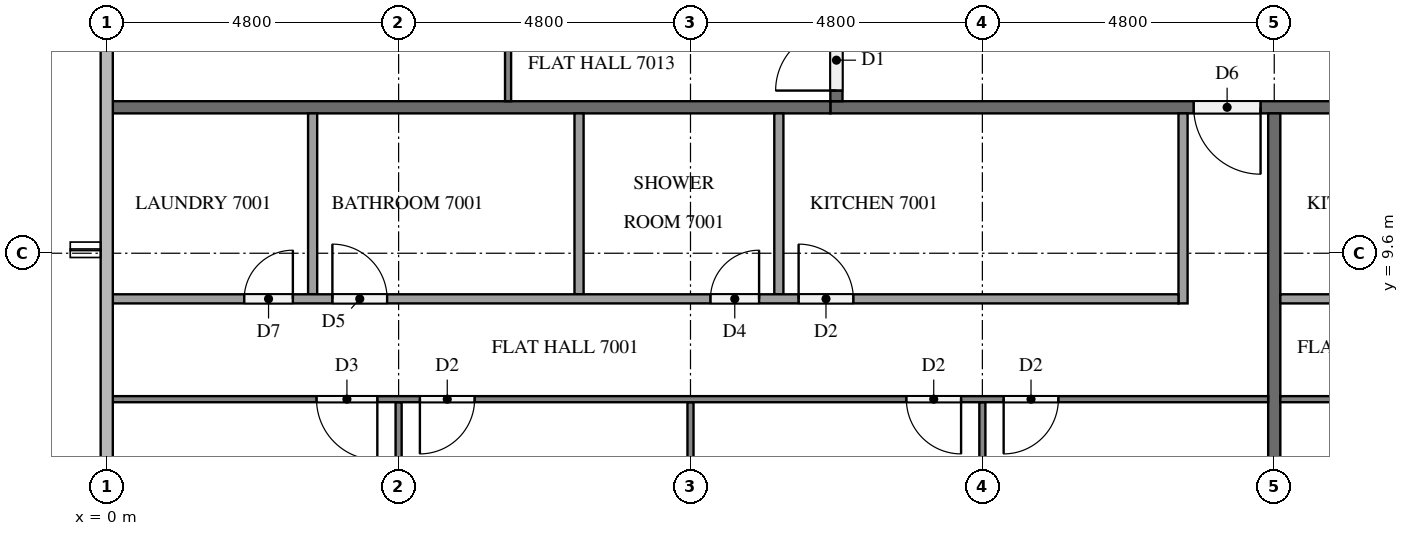
"""IFC4 building model, lengths in metres.
Left out: names, types, materials, properties, quantities, classifications, styles, units other than length and angle.
Written with IfcOpenShell. Run it as: python <this file> out.ifc"""

import sys

from ifc_helpers import new_model, si_unit, direction, frame, frame_2d, origin, place, context, subcontext, project, spatial, rectangle, extrude, element, fill, save


model = new_model("IFC4")
c1 = context("Model", 3, precision=1e-05, world=origin(), true_north=direction((0.0, 1.0)))
c2 = subcontext(c1, "Body", "Model", "MODEL_VIEW")
j1 = project(units=[si_unit("LENGTHUNIT", "METRE"), si_unit("PLANEANGLEUNIT", "RADIAN")], contexts=[c1])
p1 = place(None, origin())
s1 = spatial("IfcSite", under=j1, at=p1, CompositionType="ELEMENT")
p2 = place(p1, origin())
s2 = spatial("IfcBuilding", under=s1, at=p2, CompositionType="ELEMENT")
p3 = place(p2, frame((0.0, 0.0, 268.6)))
s3 = spatial("IfcBuildingStorey", under=s2, at=p3, CompositionType="ELEMENT", Elevation=268.6)
p4 = place(p3, frame((50.5, 12.0, 0.0), z_axis=(0.0, 0.0, 1.0), x_axis=(-1.0, 0.0, 0.0)))
e1 = element("IfcWall", 1, at=p4, inside=s3, PredefinedType="PARTITIONING", context=c2, shape_type="SweptSolid", body=[
    extrude(rectangle(XDim=38.6, YDim=0.2, at=frame_2d((19.3, 0.0))), origin(), (0.0, 0.0, 1.0), 3.2),
])
p5 = place(p4, frame((31.525, 0.0, 0.0)))
e2 = element("IfcOpeningElement", 2, at=p5, cuts=e1, PredefinedType="OPENING", context=c2, shape_type="SweptSolid", body=[
    extrude(rectangle(XDim=1.1, YDim=2.1, at=frame_2d((0.55, 1.05))), frame((0.0, 0.11, 0.0), z_axis=(0.0, -1.0, 0.0), x_axis=(1.0, 0.0, 0.0)), (0.0, 0.0, 1.0), 0.22),
])
p6 = place(p4, frame((19.575, 0.0, 0.0)))
e3 = element("IfcOpeningElement", 3, at=p6, cuts=e1, PredefinedType="OPENING", context=c2, shape_type="SweptSolid", body=[
    extrude(rectangle(XDim=1.0, YDim=2.1, at=frame_2d((0.5, 1.05))), frame((0.0, 0.11, 0.0), z_axis=(0.0, -1.0, 0.0), x_axis=(1.0, 0.0, 0.0)), (0.0, 0.0, 1.0), 0.22),
])
p7 = place(p4, frame((18.025, 0.0, 0.0)))
e4 = element("IfcOpeningElement", 4, at=p7, cuts=e1, PredefinedType="OPENING", context=c2, shape_type="SweptSolid", body=[
    extrude(rectangle(XDim=1.0, YDim=2.1, at=frame_2d((0.5, 1.05))), frame((0.0, 0.11, 0.0), z_axis=(0.0, -1.0, 0.0), x_axis=(1.0, 0.0, 0.0)), (0.0, 0.0, 1.0), 0.22),
])
p8 = place(p4, frame((1.225, 0.0, 0.0)))
e5 = element("IfcOpeningElement", 5, at=p8, cuts=e1, PredefinedType="OPENING", context=c2, shape_type="SweptSolid", body=[
    extrude(rectangle(XDim=1.0, YDim=2.1, at=frame_2d((0.5, 1.05))), frame((0.0, 0.11, 0.0), z_axis=(0.0, -1.0, 0.0), x_axis=(1.0, 0.0, 0.0)), (0.0, 0.0, 1.0), 0.22),
])
p9 = place(p3, frame((12.0, 12.1, 0.0), z_axis=(0.0, 0.0, 1.0), x_axis=(0.0, 1.0, 0.0)))
e6 = element("IfcWall", 6, at=p9, inside=s3, PredefinedType="PARTITIONING", context=c2, shape_type="SweptSolid", body=[
    extrude(rectangle(XDim=28.6, YDim=0.2, at=frame_2d((14.3, 0.0))), origin(), (0.0, 0.0, 1.0), 3.2),
])
p10 = place(p9, frame((24.175, 0.0, 0.0)))
e7 = element("IfcOpeningElement", 7, at=p10, cuts=e6, PredefinedType="OPENING", context=c2, shape_type="SweptSolid", body=[
    extrude(rectangle(XDim=1.0, YDim=2.1, at=frame_2d((0.5, 1.05))), frame((0.0, 0.11, 0.0), z_axis=(0.0, -1.0, 0.0), x_axis=(1.0, 0.0, 0.0)), (0.0, 0.0, 1.0), 0.22),
])
p11 = place(p9, frame((14.575, 0.0, 0.0)))
e8 = element("IfcOpeningElement", 8, at=p11, cuts=e6, PredefinedType="OPENING", context=c2, shape_type="SweptSolid", body=[
    extrude(rectangle(XDim=1.0, YDim=2.1, at=frame_2d((0.5, 1.05))), frame((0.0, 0.11, 0.0), z_axis=(0.0, -1.0, 0.0), x_axis=(1.0, 0.0, 0.0)), (0.0, 0.0, 1.0), 0.22),
])
p12 = place(p9, frame((0.175, 0.0, 0.0)))
e9 = element("IfcOpeningElement", 9, at=p12, cuts=e6, PredefinedType="OPENING", context=c2, shape_type="SweptSolid", body=[
    extrude(rectangle(XDim=1.0, YDim=2.1, at=frame_2d((0.5, 1.05))), frame((0.0, 0.11, 0.0), z_axis=(0.0, -1.0, 0.0), x_axis=(1.0, 0.0, 0.0)), (0.0, 0.0, 1.0), 0.22),
])
for number, where, z_axis, x_axis in (
    (10, (19.2, 11.9, 0.0), (0.0, 0.0, 1.0), (0.0, -1.0, 0.0)),
    (11, (0.1, 12.0, 0.0), (0.0, 0.0, 1.0), (1.0, 0.0, 0.0)),
):
    element("IfcWall", number, at=place(p3, frame(where, z_axis=z_axis, x_axis=x_axis)), inside=s3, PredefinedType="PARTITIONING", context=c2, shape_type="SweptSolid", body=[
        extrude(rectangle(XDim=11.8, YDim=0.2, at=frame_2d((5.9, 0.0))), origin(), (0.0, 0.0, 1.0), 3.2),
    ])
p13 = place(p3, frame((14.4, 7.15, 0.0), z_axis=(0.0, 0.0, 1.0), x_axis=(0.0, -1.0, 0.0)))
e12 = element("IfcWall", 12, at=p13, inside=s3, PredefinedType="PARTITIONING", context=c2, shape_type="SweptSolid", body=[
    extrude(rectangle(XDim=6.9, YDim=0.1, at=frame_2d((3.45, 0.0))), origin(), (0.0, 0.0, 1.0), 3.2),
])
p14 = place(p3, frame((9.6, 7.15, 0.0), z_axis=(0.0, 0.0, 1.0), x_axis=(0.0, -1.0, 0.0)))
e13 = element("IfcWall", 13, at=p14, inside=s3, PredefinedType="PARTITIONING", context=c2, shape_type="SweptSolid", body=[
    extrude(rectangle(XDim=7.05, YDim=0.1, at=frame_2d((3.525, 0.0))), origin(), (0.0, 0.0, 1.0), 3.2),
])
p15 = place(p3, frame((4.8, 7.15, 0.0), z_axis=(0.0, 0.0, 1.0), x_axis=(0.0, -1.0, 0.0)))
e14 = element("IfcWall", 14, at=p15, inside=s3, PredefinedType="PARTITIONING", context=c2, shape_type="SweptSolid", body=[
    extrude(rectangle(XDim=6.85, YDim=0.1, at=frame_2d((3.425, 0.0))), origin(), (0.0, 0.0, 1.0), 3.2),
])
p16 = place(p3, frame((19.1, 7.2, 0.0), z_axis=(0.0, 0.0, 1.0), x_axis=(-1.0, 0.0, 0.0)))
e15 = element("IfcWall", 15, at=p16, inside=s3, PredefinedType="PARTITIONING", context=c2, shape_type="SweptSolid", body=[
    extrude(rectangle(XDim=19.0, YDim=0.1, at=frame_2d((9.5, 0.0))), origin(), (0.0, 0.0, 1.0), 3.2),
])
p17 = place(p16, frame((3.45, 0.0, 0.0)))
e16 = element("IfcOpeningElement", 16, at=p17, cuts=e15, PredefinedType="OPENING", context=c2, shape_type="SweptSolid", body=[
    extrude(rectangle(XDim=0.9, YDim=2.1, at=frame_2d((0.45, 1.05))), frame((0.0, 0.06, 0.0), z_axis=(0.0, -1.0, 0.0), x_axis=(1.0, 0.0, 0.0)), (0.0, 0.0, 1.0), 0.12),
])
p18 = place(p16, frame((5.05, 0.0, 0.0)))
e17 = element("IfcOpeningElement", 17, at=p18, cuts=e15, PredefinedType="OPENING", context=c2, shape_type="SweptSolid", body=[
    extrude(rectangle(XDim=0.9, YDim=2.1, at=frame_2d((0.45, 1.05))), frame((0.0, 0.06, 0.0), z_axis=(0.0, -1.0, 0.0), x_axis=(1.0, 0.0, 0.0)), (0.0, 0.0, 1.0), 0.12),
])
p19 = place(p16, frame((13.05, 0.0, 0.0)))
e18 = element("IfcOpeningElement", 18, at=p19, cuts=e15, PredefinedType="OPENING", context=c2, shape_type="SweptSolid", body=[
    extrude(rectangle(XDim=0.9, YDim=2.1, at=frame_2d((0.45, 1.05))), frame((0.0, 0.06, 0.0), z_axis=(0.0, -1.0, 0.0), x_axis=(1.0, 0.0, 0.0)), (0.0, 0.0, 1.0), 0.12),
])
p20 = place(p16, frame((14.65, 0.0, 0.0)))
e19 = element("IfcOpeningElement", 19, at=p20, cuts=e15, PredefinedType="OPENING", context=c2, shape_type="SweptSolid", body=[
    extrude(rectangle(XDim=1.0, YDim=2.1, at=frame_2d((0.5, 1.05))), frame((0.0, 0.06, 0.0), z_axis=(0.0, -1.0, 0.0), x_axis=(1.0, 0.0, 0.0)), (0.0, 0.0, 1.0), 0.12),
])
for number, where, z_axis, x_axis in (
    (20, (11.053, 11.9, 0.0), (0.0, 0.0, 1.0), (0.0, -1.0, 0.0)),
    (21, (7.767, 11.9, 0.0), (0.0, 0.0, 1.0), (0.0, -1.0, 0.0)),
    (22, (3.386, 11.9, 0.0), (0.0, 0.0, 1.0), (0.0, -1.0, 0.0)),
):
    element("IfcWall", number, at=place(p3, frame(where, z_axis=z_axis, x_axis=x_axis)), inside=s3, PredefinedType="PARTITIONING", context=c2, shape_type="SweptSolid", body=[
        extrude(rectangle(XDim=2.975, YDim=0.15, at=frame_2d((1.487, 0.0))), origin(), (0.0, 0.0, 1.0), 3.2),
    ])
p21 = place(p3, frame((17.7, 11.9, 0.0), z_axis=(0.0, 0.0, 1.0), x_axis=(0.0, -1.0, 0.0)))
e23 = element("IfcWall", 23, at=p21, inside=s3, PredefinedType="PARTITIONING", context=c2, shape_type="SweptSolid", body=[
    extrude(rectangle(XDim=3.125, YDim=0.15, at=frame_2d((1.562, 0.0))), origin(), (0.0, 0.0, 1.0), 3.2),
])
p22 = place(p3, frame((0.1, 8.85, 0.0), z_axis=(0.0, 0.0, 1.0), x_axis=(1.0, 0.0, 0.0)))
e24 = element("IfcWall", 24, at=p22, inside=s3, PredefinedType="PARTITIONING", context=c2, shape_type="SweptSolid", body=[
    extrude(rectangle(XDim=17.525, YDim=0.15, at=frame_2d((8.762, 0.0))), origin(), (0.0, 0.0, 1.0), 3.2),
])
p23 = place(p22, frame((11.278, 0.0, 0.0)))
e25 = element("IfcOpeningElement", 25, at=p23, cuts=e24, PredefinedType="OPENING", context=c2, shape_type="SweptSolid", body=[
    extrude(rectangle(XDim=0.9, YDim=2.1, at=frame_2d((0.45, 1.05))), frame((0.0, 0.085, 0.0), z_axis=(0.0, -1.0, 0.0), x_axis=(1.0, 0.0, 0.0)), (0.0, 0.0, 1.0), 0.17),
])
p24 = place(p22, frame((9.828, 0.0, 0.0)))
e26 = element("IfcOpeningElement", 26, at=p24, cuts=e24, PredefinedType="OPENING", context=c2, shape_type="SweptSolid", body=[
    extrude(rectangle(XDim=0.8, YDim=2.1, at=frame_2d((0.4, 1.05))), frame((0.0, 0.085, 0.0), z_axis=(0.0, -1.0, 0.0), x_axis=(1.0, 0.0, 0.0)), (0.0, 0.0, 1.0), 0.17),
])
p25 = place(p22, frame((3.611, 0.0, 0.0)))
e27 = element("IfcOpeningElement", 27, at=p25, cuts=e24, PredefinedType="OPENING", context=c2, shape_type="SweptSolid", body=[
    extrude(rectangle(XDim=0.9, YDim=2.1, at=frame_2d((0.45, 1.05))), frame((0.0, 0.085, 0.0), z_axis=(0.0, -1.0, 0.0), x_axis=(1.0, 0.0, 0.0)), (0.0, 0.0, 1.0), 0.17),
])
p26 = place(p22, frame((2.161, 0.0, 0.0)))
e28 = element("IfcOpeningElement", 28, at=p26, cuts=e24, PredefinedType="OPENING", context=c2, shape_type="SweptSolid", body=[
    extrude(rectangle(XDim=0.8, YDim=2.1, at=frame_2d((0.4, 1.05))), frame((0.0, 0.085, 0.0), z_axis=(0.0, -1.0, 0.0), x_axis=(1.0, 0.0, 0.0)), (0.0, 0.0, 1.0), 0.17),
])
p27 = place(p3, frame((31.1, 7.2, 0.0), z_axis=(0.0, 0.0, 1.0), x_axis=(-1.0, 0.0, 0.0)))
e29 = element("IfcWall", 29, at=p27, inside=s3, PredefinedType="PARTITIONING", context=c2, shape_type="SweptSolid", body=[
    extrude(rectangle(XDim=11.8, YDim=0.1, at=frame_2d((5.9, 0.0))), origin(), (0.0, 0.0, 1.0), 3.2),
])
p28 = place(p27, frame((3.45, 0.0, 0.0)))
e30 = element("IfcOpeningElement", 30, at=p28, cuts=e29, PredefinedType="OPENING", context=c2, shape_type="SweptSolid", body=[
    extrude(rectangle(XDim=0.9, YDim=2.1, at=frame_2d((0.45, 1.05))), frame((0.0, 0.06, 0.0), z_axis=(0.0, -1.0, 0.0), x_axis=(1.0, 0.0, 0.0)), (0.0, 0.0, 1.0), 0.12),
])
p29 = place(p27, frame((5.05, 0.0, 0.0)))
e31 = element("IfcOpeningElement", 31, at=p29, cuts=e29, PredefinedType="OPENING", context=c2, shape_type="SweptSolid", body=[
    extrude(rectangle(XDim=1.0, YDim=2.1, at=frame_2d((0.5, 1.05))), frame((0.0, 0.06, 0.0), z_axis=(0.0, -1.0, 0.0), x_axis=(1.0, 0.0, 0.0)), (0.0, 0.0, 1.0), 0.12),
])
p30 = place(p3, frame((19.3, 8.85, 0.0), z_axis=(0.0, 0.0, 1.0), x_axis=(1.0, 0.0, 0.0)))
e32 = element("IfcWall", 32, at=p30, inside=s3, PredefinedType="PARTITIONING", context=c2, shape_type="SweptSolid", body=[
    extrude(rectangle(XDim=10.325, YDim=0.15, at=frame_2d((5.163, 0.0))), origin(), (0.0, 0.0, 1.0), 3.2),
])
p31 = place(p30, frame((6.52, 0.0, 0.0)))
e33 = element("IfcOpeningElement", 33, at=p31, cuts=e32, PredefinedType="OPENING", context=c2, shape_type="SweptSolid", body=[
    extrude(rectangle(XDim=0.8, YDim=2.1, at=frame_2d((0.4, 1.05))), frame((0.0, 0.085, 0.0), z_axis=(0.0, -1.0, 0.0), x_axis=(1.0, 0.0, 0.0)), (0.0, 0.0, 1.0), 0.17),
])
p32 = place(p30, frame((4.97, 0.0, 0.0)))
e34 = element("IfcOpeningElement", 34, at=p32, cuts=e32, PredefinedType="OPENING", context=c2, shape_type="SweptSolid", body=[
    extrude(rectangle(XDim=0.9, YDim=2.1, at=frame_2d((0.45, 1.05))), frame((0.0, 0.085, 0.0), z_axis=(0.0, -1.0, 0.0), x_axis=(1.0, 0.0, 0.0)), (0.0, 0.0, 1.0), 0.17),
])
p33 = place(p3, frame((6.6, 12.1, 0.0), z_axis=(0.0, 0.0, 1.0), x_axis=(0.0, 1.0, 0.0)))
e35 = element("IfcWall", 35, at=p33, inside=s3, PredefinedType="PARTITIONING", context=c2, shape_type="SweptSolid", body=[
    extrude(rectangle(XDim=14.2, YDim=0.1, at=frame_2d((7.1, 0.0))), origin(), (0.0, 0.0, 1.0), 3.2),
])
p34 = place(p33, frame((3.35, 0.0, 0.0)))
e36 = element("IfcOpeningElement", 36, at=p34, cuts=e35, PredefinedType="OPENING", context=c2, shape_type="SweptSolid", body=[
    extrude(rectangle(XDim=1.0, YDim=2.1, at=frame_2d((0.5, 1.05))), frame((0.0, 0.06, 0.0), z_axis=(0.0, -1.0, 0.0), x_axis=(1.0, 0.0, 0.0)), (0.0, 0.0, 1.0), 0.12),
])
p35 = place(p33, frame((5.05, 0.0, 0.0)))
e37 = element("IfcOpeningElement", 37, at=p35, cuts=e35, PredefinedType="OPENING", context=c2, shape_type="SweptSolid", body=[
    extrude(rectangle(XDim=0.9, YDim=2.1, at=frame_2d((0.45, 1.05))), frame((0.0, 0.06, 0.0), z_axis=(0.0, -1.0, 0.0), x_axis=(1.0, 0.0, 0.0)), (0.0, 0.0, 1.0), 0.12),
])
p36 = place(p33, frame((13.0, 0.0, 0.0)))
e38 = element("IfcOpeningElement", 38, at=p36, cuts=e35, PredefinedType="OPENING", context=c2, shape_type="SweptSolid", body=[
    extrude(rectangle(XDim=0.9, YDim=2.1, at=frame_2d((0.45, 1.05))), frame((0.0, 0.06, 0.0), z_axis=(0.0, -1.0, 0.0), x_axis=(1.0, 0.0, 0.0)), (0.0, 0.0, 1.0), 0.12),
])
p37 = place(p5, origin())
e39 = element("IfcDoor", 39, at=p37, inside=s3, OperationType="SINGLE_SWING_LEFT", PredefinedType="DOOR", context=c2, shape_type="SweptSolid", body=[
    extrude(rectangle(XDim=1.1, YDim=2.1, at=frame_2d((0.55, 1.05))), frame((0.0, 0.025, 0.0), z_axis=(0.0, -1.0, 0.0), x_axis=(1.0, 0.0, 0.0)), (0.0, 0.0, 1.0), 0.05),
])
fill(e2, e39)
p38 = place(p12, origin())
e40 = element("IfcDoor", 40, at=p38, inside=s3, OperationType="SINGLE_SWING_LEFT", PredefinedType="DOOR", context=c2, shape_type="SweptSolid", body=[
    extrude(rectangle(XDim=1.0, YDim=2.1, at=frame_2d((0.5, 1.05))), frame((0.0, 0.025, 0.0), z_axis=(0.0, -1.0, 0.0), x_axis=(1.0, 0.0, 0.0)), (0.0, 0.0, 1.0), 0.05),
])
fill(e9, e40)
p39 = place(p17, origin())
e41 = element("IfcDoor", 41, at=p39, inside=s3, OperationType="SINGLE_SWING_RIGHT", PredefinedType="DOOR", context=c2, shape_type="SweptSolid", body=[
    extrude(rectangle(XDim=0.9, YDim=2.1, at=frame_2d((0.45, 1.05))), frame((0.0, 0.025, 0.0), z_axis=(0.0, -1.0, 0.0), x_axis=(1.0, 0.0, 0.0)), (0.0, 0.0, 1.0), 0.05),
])
fill(e16, e41)
p40 = place(p18, origin())
e42 = element("IfcDoor", 42, at=p40, inside=s3, OperationType="SINGLE_SWING_LEFT", PredefinedType="DOOR", context=c2, shape_type="SweptSolid", body=[
    extrude(rectangle(XDim=0.9, YDim=2.1, at=frame_2d((0.45, 1.05))), frame((0.0, 0.025, 0.0), z_axis=(0.0, -1.0, 0.0), x_axis=(1.0, 0.0, 0.0)), (0.0, 0.0, 1.0), 0.05),
])
fill(e17, e42)
p41 = place(p19, origin())
e43 = element("IfcDoor", 43, at=p41, inside=s3, OperationType="SINGLE_SWING_RIGHT", PredefinedType="DOOR", context=c2, shape_type="SweptSolid", body=[
    extrude(rectangle(XDim=0.9, YDim=2.1, at=frame_2d((0.45, 1.05))), frame((0.0, 0.025, 0.0), z_axis=(0.0, -1.0, 0.0), x_axis=(1.0, 0.0, 0.0)), (0.0, 0.0, 1.0), 0.05),
])
fill(e18, e43)
p42 = place(p20, origin())
e44 = element("IfcDoor", 44, at=p42, inside=s3, OperationType="SINGLE_SWING_LEFT", PredefinedType="DOOR", context=c2, shape_type="SweptSolid", body=[
    extrude(rectangle(XDim=1.0, YDim=2.1, at=frame_2d((0.5, 1.05))), frame((0.0, 0.025, 0.0), z_axis=(0.0, -1.0, 0.0), x_axis=(1.0, 0.0, 0.0)), (0.0, 0.0, 1.0), 0.05),
])
fill(e19, e44)
p43 = place(p23, origin())
e45 = element("IfcDoor", 45, at=p43, inside=s3, OperationType="SINGLE_SWING_LEFT", PredefinedType="DOOR", context=c2, shape_type="SweptSolid", body=[
    extrude(rectangle(XDim=0.9, YDim=2.1, at=frame_2d((0.45, 1.05))), frame((0.0, 0.025, 0.0), z_axis=(0.0, -1.0, 0.0), x_axis=(1.0, 0.0, 0.0)), (0.0, 0.0, 1.0), 0.05),
])
fill(e25, e45)
p44 = place(p24, origin())
e46 = element("IfcDoor", 46, at=p44, inside=s3, OperationType="SINGLE_SWING_RIGHT", PredefinedType="DOOR", context=c2, shape_type="SweptSolid", body=[
    extrude(rectangle(XDim=0.8, YDim=2.1, at=frame_2d((0.4, 1.05))), frame((0.0, 0.025, 0.0), z_axis=(0.0, -1.0, 0.0), x_axis=(1.0, 0.0, 0.0)), (0.0, 0.0, 1.0), 0.05),
])
fill(e26, e46)
p45 = place(p25, origin())
e47 = element("IfcDoor", 47, at=p45, inside=s3, OperationType="SINGLE_SWING_LEFT", PredefinedType="DOOR", context=c2, shape_type="SweptSolid", body=[
    extrude(rectangle(XDim=0.9, YDim=2.1, at=frame_2d((0.45, 1.05))), frame((0.0, 0.025, 0.0), z_axis=(0.0, -1.0, 0.0), x_axis=(1.0, 0.0, 0.0)), (0.0, 0.0, 1.0), 0.05),
])
fill(e27, e47)
p46 = place(p26, origin())
e48 = element("IfcDoor", 48, at=p46, inside=s3, OperationType="SINGLE_SWING_RIGHT", PredefinedType="DOOR", context=c2, shape_type="SweptSolid", body=[
    extrude(rectangle(XDim=0.8, YDim=2.1, at=frame_2d((0.4, 1.05))), frame((0.0, 0.025, 0.0), z_axis=(0.0, -1.0, 0.0), x_axis=(1.0, 0.0, 0.0)), (0.0, 0.0, 1.0), 0.05),
])
fill(e28, e48)
save(model, sys.argv[1])
